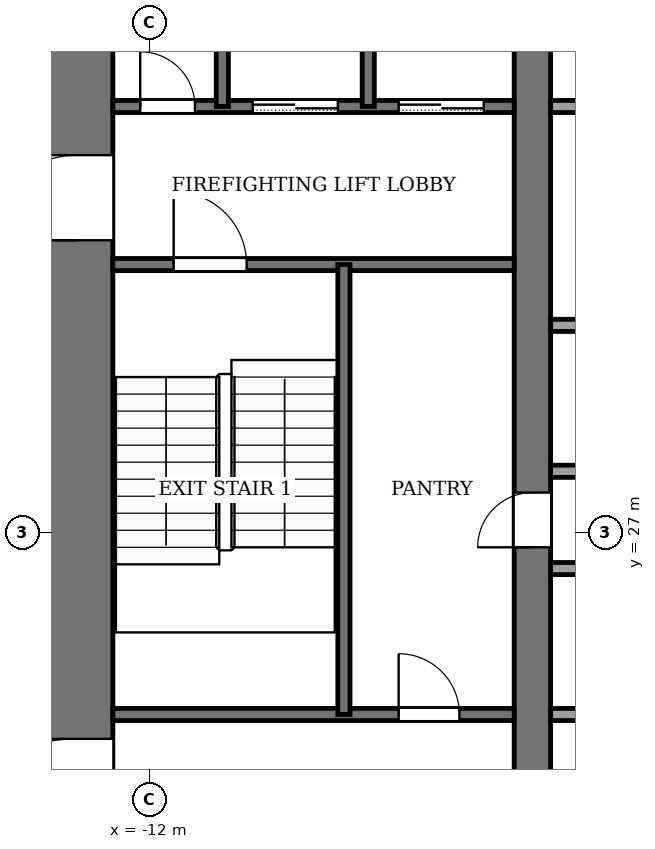
"""IFC4 building model, lengths in metres.
Left out: names, types, materials, properties, quantities, classifications, styles, units other than length and angle.
Written with IfcOpenShell. Run it as: python <this file> out.ifc"""

import sys

from ifc_helpers import new_model, si_unit, direction, frame, frame_2d, origin, place, context, subcontext, project, spatial, rectangle, extrude, element, fill, save


model = new_model("IFC4")
c1 = context("Model", 3, precision=1e-05, world=origin(), true_north=direction((0.0, 1.0)))
c2 = subcontext(c1, "Body", "Model", "MODEL_VIEW")
j1 = project(units=[si_unit("LENGTHUNIT", "METRE"), si_unit("PLANEANGLEUNIT", "RADIAN")], contexts=[c1])
p1 = place(None, origin())
s1 = spatial("IfcSite", under=j1, at=p1, CompositionType="ELEMENT")
p2 = place(p1, origin())
s2 = spatial("IfcBuilding", under=s1, at=p2, CompositionType="ELEMENT")
p3 = place(p2, frame((0.0, 0.0, 70.0)))
s3 = spatial("IfcBuildingStorey", under=s2, at=p3, CompositionType="ELEMENT", Elevation=70.0)
p4 = place(p3, frame((-13.2, 18.4, -0.13), z_axis=(0.0, 0.0, 1.0), x_axis=(0.0, 1.0, 0.0)))
e1 = element("IfcWall", 1, at=p4, inside=s3, PredefinedType="SHEAR", context=c2, shape_type="SweptSolid", body=[
    extrude(rectangle(XDim=19.2, YDim=1.2, at=frame_2d((9.6, 0.0))), origin(), (0.0, 0.0, 1.0), 4.0),
])
p5 = place(p4, frame((2.8, 0.0, 0.13)))
e2 = element("IfcOpeningElement", 2, at=p5, cuts=e1, PredefinedType="OPENING", context=c2, shape_type="SweptSolid", body=[
    extrude(rectangle(XDim=2.4, YDim=2.4, at=frame_2d((1.2, 1.2))), frame((0.0, 0.61, 0.0), z_axis=(0.0, -1.0, 0.0), x_axis=(1.0, 0.0, 0.0)), (0.0, 0.0, 1.0), 1.22),
])
p6 = place(p4, frame((13.4, 0.0, 0.13)))
e3 = element("IfcOpeningElement", 3, at=p6, cuts=e1, PredefinedType="OPENING", context=c2, shape_type="SweptSolid", body=[
    extrude(rectangle(XDim=1.4, YDim=2.2, at=frame_2d((0.7, 1.1))), frame((0.0, 0.61, 0.0), z_axis=(0.0, -1.0, 0.0), x_axis=(1.0, 0.0, 0.0)), (0.0, 0.0, 1.0), 1.22),
])
p7 = place(p3, frame((-5.7, 18.4, -0.13), z_axis=(0.0, 0.0, 1.0), x_axis=(0.0, 1.0, 0.0)))
e4 = element("IfcWall", 4, at=p7, inside=s3, PredefinedType="SHEAR", context=c2, shape_type="SweptSolid", body=[
    extrude(rectangle(XDim=19.2, YDim=0.6, at=frame_2d((9.6, 0.0))), origin(), (0.0, 0.0, 1.0), 4.0),
])
p8 = place(p7, frame((8.35, 0.0, 0.13)))
e5 = element("IfcOpeningElement", 5, at=p8, cuts=e4, PredefinedType="OPENING", context=c2, shape_type="SweptSolid", body=[
    extrude(rectangle(XDim=0.9, YDim=2.1, at=frame_2d((0.45, 1.05))), frame((0.0, 0.31, 0.0), z_axis=(0.0, -1.0, 0.0), x_axis=(1.0, 0.0, 0.0)), (0.0, 0.0, 1.0), 0.62),
])
p9 = place(p3, frame((-12.6, 24.0, 0.0), z_axis=(0.0, 0.0, 1.0), x_axis=(1.0, 0.0, 0.0)))
e6 = element("IfcWall", 6, at=p9, inside=s3, PredefinedType="PARTITIONING", context=c2, shape_type="SweptSolid", body=[
    extrude(rectangle(XDim=6.6, YDim=0.2, at=frame_2d((3.3, 0.0))), origin(), (0.0, 0.0, 1.0), 3.87),
])
p10 = place(p9, frame((4.7, 0.0, 0.0)))
e7 = element("IfcOpeningElement", 7, at=p10, cuts=e6, PredefinedType="OPENING", context=c2, shape_type="SweptSolid", body=[
    extrude(rectangle(XDim=1.0, YDim=2.1, at=frame_2d((0.5, 1.05))), frame((0.0, 0.11, 0.0), z_axis=(0.0, -1.0, 0.0), x_axis=(1.0, 0.0, 0.0)), (0.0, 0.0, 1.0), 0.22),
])
p11 = place(p3, frame((-5.4, 24.0, 0.0), z_axis=(0.0, 0.0, 1.0), x_axis=(1.0, 0.0, 0.0)))
e8 = element("IfcWall", 8, at=p11, inside=s3, PredefinedType="PARTITIONING", context=c2, shape_type="SweptSolid", body=[
    extrude(rectangle(XDim=10.8, YDim=0.2, at=frame_2d((5.4, 0.0))), origin(), (0.0, 0.0, 1.0), 3.87),
])
p12 = place(p11, frame((0.75, 0.0, 0.0)))
e9 = element("IfcOpeningElement", 9, at=p12, cuts=e8, PredefinedType="OPENING", context=c2, shape_type="SweptSolid", body=[
    extrude(rectangle(XDim=1.2, YDim=2.2, at=frame_2d((0.6, 1.1))), frame((0.0, 0.11, 0.0), z_axis=(0.0, -1.0, 0.0), x_axis=(1.0, 0.0, 0.0)), (0.0, 0.0, 1.0), 0.22),
])
p13 = place(p11, frame((3.45, 0.0, 0.0)))
e10 = element("IfcOpeningElement", 10, at=p13, cuts=e8, PredefinedType="OPENING", context=c2, shape_type="SweptSolid", body=[
    extrude(rectangle(XDim=1.2, YDim=2.2, at=frame_2d((0.6, 1.1))), frame((0.0, 0.11, 0.0), z_axis=(0.0, -1.0, 0.0), x_axis=(1.0, 0.0, 0.0)), (0.0, 0.0, 1.0), 0.22),
])
p14 = place(p11, frame((6.15, 0.0, 0.0)))
e11 = element("IfcOpeningElement", 11, at=p14, cuts=e8, PredefinedType="OPENING", context=c2, shape_type="SweptSolid", body=[
    extrude(rectangle(XDim=1.2, YDim=2.2, at=frame_2d((0.6, 1.1))), frame((0.0, 0.11, 0.0), z_axis=(0.0, -1.0, 0.0), x_axis=(1.0, 0.0, 0.0)), (0.0, 0.0, 1.0), 0.22),
])
p15 = place(p11, frame((8.85, 0.0, 0.0)))
e12 = element("IfcOpeningElement", 12, at=p15, cuts=e8, PredefinedType="OPENING", context=c2, shape_type="SweptSolid", body=[
    extrude(rectangle(XDim=1.2, YDim=2.2, at=frame_2d((0.6, 1.1))), frame((0.0, 0.11, 0.0), z_axis=(0.0, -1.0, 0.0), x_axis=(1.0, 0.0, 0.0)), (0.0, 0.0, 1.0), 0.22),
])
for number, where, z_axis, x_axis in (
    (13, (-5.4, 26.4, 0.0), (0.0, 0.0, 1.0), (1.0, 0.0, 0.0)),
    (14, (-5.4, 28.0, 0.0), (0.0, 0.0, 1.0), (1.0, 0.0, 0.0)),
    (15, (-5.4, 30.4, 0.0), (0.0, 0.0, 1.0), (1.0, 0.0, 0.0)),
):
    element("IfcWall", number, at=place(p3, frame(where, z_axis=z_axis, x_axis=x_axis)), inside=s3, PredefinedType="PARTITIONING", context=c2, shape_type="SweptSolid", body=[
        extrude(rectangle(XDim=10.8, YDim=0.2, at=frame_2d((5.4, 0.0))), origin(), (0.0, 0.0, 1.0), 3.87),
    ])
p16 = place(p3, frame((-12.6, 31.4, 0.0), z_axis=(0.0, 0.0, 1.0), x_axis=(1.0, 0.0, 0.0)))
e16 = element("IfcWall", 16, at=p16, inside=s3, PredefinedType="PARTITIONING", context=c2, shape_type="SweptSolid", body=[
    extrude(rectangle(XDim=6.6, YDim=0.2, at=frame_2d((3.3, 0.0))), origin(), (0.0, 0.0, 1.0), 3.87),
])
p17 = place(p16, frame((1.0, 0.0, 0.0)))
e17 = element("IfcOpeningElement", 17, at=p17, cuts=e16, PredefinedType="OPENING", context=c2, shape_type="SweptSolid", body=[
    extrude(rectangle(XDim=1.2, YDim=2.2, at=frame_2d((0.6, 1.1))), frame((0.0, 0.11, 0.0), z_axis=(0.0, -1.0, 0.0), x_axis=(1.0, 0.0, 0.0)), (0.0, 0.0, 1.0), 0.22),
])
p18 = place(p3, frame((-12.6, 34.0, 0.0), z_axis=(0.0, 0.0, 1.0), x_axis=(1.0, 0.0, 0.0)))
e18 = element("IfcWall", 18, at=p18, inside=s3, PredefinedType="PARTITIONING", context=c2, shape_type="SweptSolid", body=[
    extrude(rectangle(XDim=6.6, YDim=0.2, at=frame_2d((3.3, 0.0))), origin(), (0.0, 0.0, 1.0), 3.87),
])
p19 = place(p18, frame((4.7, 0.0, 0.0)))
e19 = element("IfcOpeningElement", 19, at=p19, cuts=e18, PredefinedType="OPENING", context=c2, shape_type="SweptSolid", body=[
    extrude(rectangle(XDim=1.4, YDim=2.2, at=frame_2d((0.7, 1.1))), frame((0.0, 0.11, 0.0), z_axis=(0.0, -1.0, 0.0), x_axis=(1.0, 0.0, 0.0)), (0.0, 0.0, 1.0), 0.22),
])
p20 = place(p18, frame((2.3, 0.0, 0.0)))
e20 = element("IfcOpeningElement", 20, at=p20, cuts=e18, PredefinedType="OPENING", context=c2, shape_type="SweptSolid", body=[
    extrude(rectangle(XDim=1.4, YDim=2.2, at=frame_2d((0.7, 1.1))), frame((0.0, 0.11, 0.0), z_axis=(0.0, -1.0, 0.0), x_axis=(1.0, 0.0, 0.0)), (0.0, 0.0, 1.0), 0.22),
])
p21 = place(p18, frame((0.45, 0.0, 0.0)))
e21 = element("IfcOpeningElement", 21, at=p21, cuts=e18, PredefinedType="OPENING", context=c2, shape_type="SweptSolid", body=[
    extrude(rectangle(XDim=0.9, YDim=2.1, at=frame_2d((0.45, 1.05))), frame((0.0, 0.11, 0.0), z_axis=(0.0, -1.0, 0.0), x_axis=(1.0, 0.0, 0.0)), (0.0, 0.0, 1.0), 0.22),
])
p22 = place(p3, frame((-5.4, 34.0, 0.0), z_axis=(0.0, 0.0, 1.0), x_axis=(1.0, 0.0, 0.0)))
e22 = element("IfcWall", 22, at=p22, inside=s3, PredefinedType="PARTITIONING", context=c2, shape_type="SweptSolid", body=[
    extrude(rectangle(XDim=10.8, YDim=0.2, at=frame_2d((5.4, 0.0))), origin(), (0.0, 0.0, 1.0), 3.87),
])
p23 = place(p22, frame((6.15, 0.0, 0.0)))
e23 = element("IfcOpeningElement", 23, at=p23, cuts=e22, PredefinedType="OPENING", context=c2, shape_type="SweptSolid", body=[
    extrude(rectangle(XDim=1.2, YDim=2.2, at=frame_2d((0.6, 1.1))), frame((0.0, 0.11, 0.0), z_axis=(0.0, -1.0, 0.0), x_axis=(1.0, 0.0, 0.0)), (0.0, 0.0, 1.0), 0.22),
])
p24 = place(p22, frame((8.95, 0.0, 0.0)))
e24 = element("IfcOpeningElement", 24, at=p24, cuts=e22, PredefinedType="OPENING", context=c2, shape_type="SweptSolid", body=[
    extrude(rectangle(XDim=1.0, YDim=2.1, at=frame_2d((0.5, 1.05))), frame((0.0, 0.11, 0.0), z_axis=(0.0, -1.0, 0.0), x_axis=(1.0, 0.0, 0.0)), (0.0, 0.0, 1.0), 0.22),
])
p25 = place(p3, frame((-10.8, 34.0, 0.0), z_axis=(0.0, 0.0, 1.0), x_axis=(0.0, 1.0, 0.0)))
e25 = element("IfcWall", 25, at=p25, inside=s3, PredefinedType="PARTITIONING", context=c2, shape_type="SweptSolid", body=[
    extrude(rectangle(XDim=3.6, YDim=0.2, at=frame_2d((1.8, 0.0))), origin(), (0.0, 0.0, 1.0), 3.87),
])
p26 = place(p3, frame((-8.8, 24.0, 0.0), z_axis=(0.0, 0.0, 1.0), x_axis=(0.0, 1.0, 0.0)))
e26 = element("IfcWall", 26, at=p26, inside=s3, PredefinedType="PARTITIONING", context=c2, shape_type="SweptSolid", body=[
    extrude(rectangle(XDim=7.4, YDim=0.2, at=frame_2d((3.7, 0.0))), origin(), (0.0, 0.0, 1.0), 3.87),
])
p27 = place(p3, frame((-8.4, 34.0, 0.0), z_axis=(0.0, 0.0, 1.0), x_axis=(0.0, 1.0, 0.0)))
e27 = element("IfcWall", 27, at=p27, inside=s3, PredefinedType="PARTITIONING", context=c2, shape_type="SweptSolid", body=[
    extrude(rectangle(XDim=3.6, YDim=0.2, at=frame_2d((1.8, 0.0))), origin(), (0.0, 0.0, 1.0), 3.87),
])
p28 = place(p19, origin())
e28 = element("IfcDoor", 28, at=p28, inside=s3, OperationType="SLIDING_TO_LEFT", PredefinedType="DOOR", context=c2, shape_type="SweptSolid", body=[
    extrude(rectangle(XDim=1.4, YDim=2.2, at=frame_2d((0.7, 1.1))), frame((0.0, 0.025, 0.0), z_axis=(0.0, -1.0, 0.0), x_axis=(1.0, 0.0, 0.0)), (0.0, 0.0, 1.0), 0.05),
])
fill(e19, e28)
p29 = place(p20, origin())
e29 = element("IfcDoor", 29, at=p29, inside=s3, OperationType="SLIDING_TO_LEFT", PredefinedType="DOOR", context=c2, shape_type="SweptSolid", body=[
    extrude(rectangle(XDim=1.4, YDim=2.2, at=frame_2d((0.7, 1.1))), frame((0.0, 0.025, 0.0), z_axis=(0.0, -1.0, 0.0), x_axis=(1.0, 0.0, 0.0)), (0.0, 0.0, 1.0), 0.05),
])
fill(e20, e29)
p30 = place(p21, origin())
e30 = element("IfcDoor", 30, at=p30, inside=s3, OperationType="SINGLE_SWING_RIGHT", PredefinedType="DOOR", context=c2, shape_type="SweptSolid", body=[
    extrude(rectangle(XDim=0.9, YDim=2.1, at=frame_2d((0.45, 1.05))), frame((0.0, 0.025, 0.0), z_axis=(0.0, -1.0, 0.0), x_axis=(1.0, 0.0, 0.0)), (0.0, 0.0, 1.0), 0.05),
])
fill(e21, e30)
p31 = place(p10, origin())
e31 = element("IfcDoor", 31, at=p31, inside=s3, OperationType="SINGLE_SWING_RIGHT", PredefinedType="DOOR", context=c2, shape_type="SweptSolid", body=[
    extrude(rectangle(XDim=1.0, YDim=2.1, at=frame_2d((0.5, 1.05))), frame((0.0, 0.025, 0.0), z_axis=(0.0, -1.0, 0.0), x_axis=(1.0, 0.0, 0.0)), (0.0, 0.0, 1.0), 0.05),
])
fill(e7, e31)
p32 = place(p8, origin())
e32 = element("IfcDoor", 32, at=p32, inside=s3, OperationType="SINGLE_SWING_LEFT", PredefinedType="DOOR", context=c2, shape_type="SweptSolid", body=[
    extrude(rectangle(XDim=0.9, YDim=2.1, at=frame_2d((0.45, 1.05))), frame((0.0, 0.025, 0.0), z_axis=(0.0, -1.0, 0.0), x_axis=(1.0, 0.0, 0.0)), (0.0, 0.0, 1.0), 0.05),
])
fill(e5, e32)
p33 = place(p17, origin())
e33 = element("IfcDoor", 33, at=p33, inside=s3, OperationType="SINGLE_SWING_LEFT", PredefinedType="DOOR", context=c2, shape_type="SweptSolid", body=[
    extrude(rectangle(XDim=1.2, YDim=2.2, at=frame_2d((0.6, 1.1))), frame((0.0, 0.025, 0.0), z_axis=(0.0, -1.0, 0.0), x_axis=(1.0, 0.0, 0.0)), (0.0, 0.0, 1.0), 0.05),
])
fill(e17, e33)
p34 = place(p5, origin())
e34 = element("IfcDoor", 34, at=p34, inside=s3, OperationType="DOUBLE_DOOR_SINGLE_SWING", PredefinedType="DOOR", context=c2, shape_type="SweptSolid", body=[
    extrude(rectangle(XDim=2.4, YDim=2.4, at=frame_2d((1.2, 1.2))), frame((0.0, 0.025, 0.0), z_axis=(0.0, -1.0, 0.0), x_axis=(1.0, 0.0, 0.0)), (0.0, 0.0, 1.0), 0.05),
])
fill(e2, e34)
p35 = place(p6, origin())
e35 = element("IfcDoor", 35, at=p35, inside=s3, OperationType="SINGLE_SWING_LEFT", PredefinedType="DOOR", context=c2, shape_type="SweptSolid", body=[
    extrude(rectangle(XDim=1.4, YDim=2.2, at=frame_2d((0.7, 1.1))), frame((0.0, 0.025, 0.0), z_axis=(0.0, -1.0, 0.0), x_axis=(1.0, 0.0, 0.0)), (0.0, 0.0, 1.0), 0.05),
])
fill(e3, e35)
save(model, sys.argv[1])
